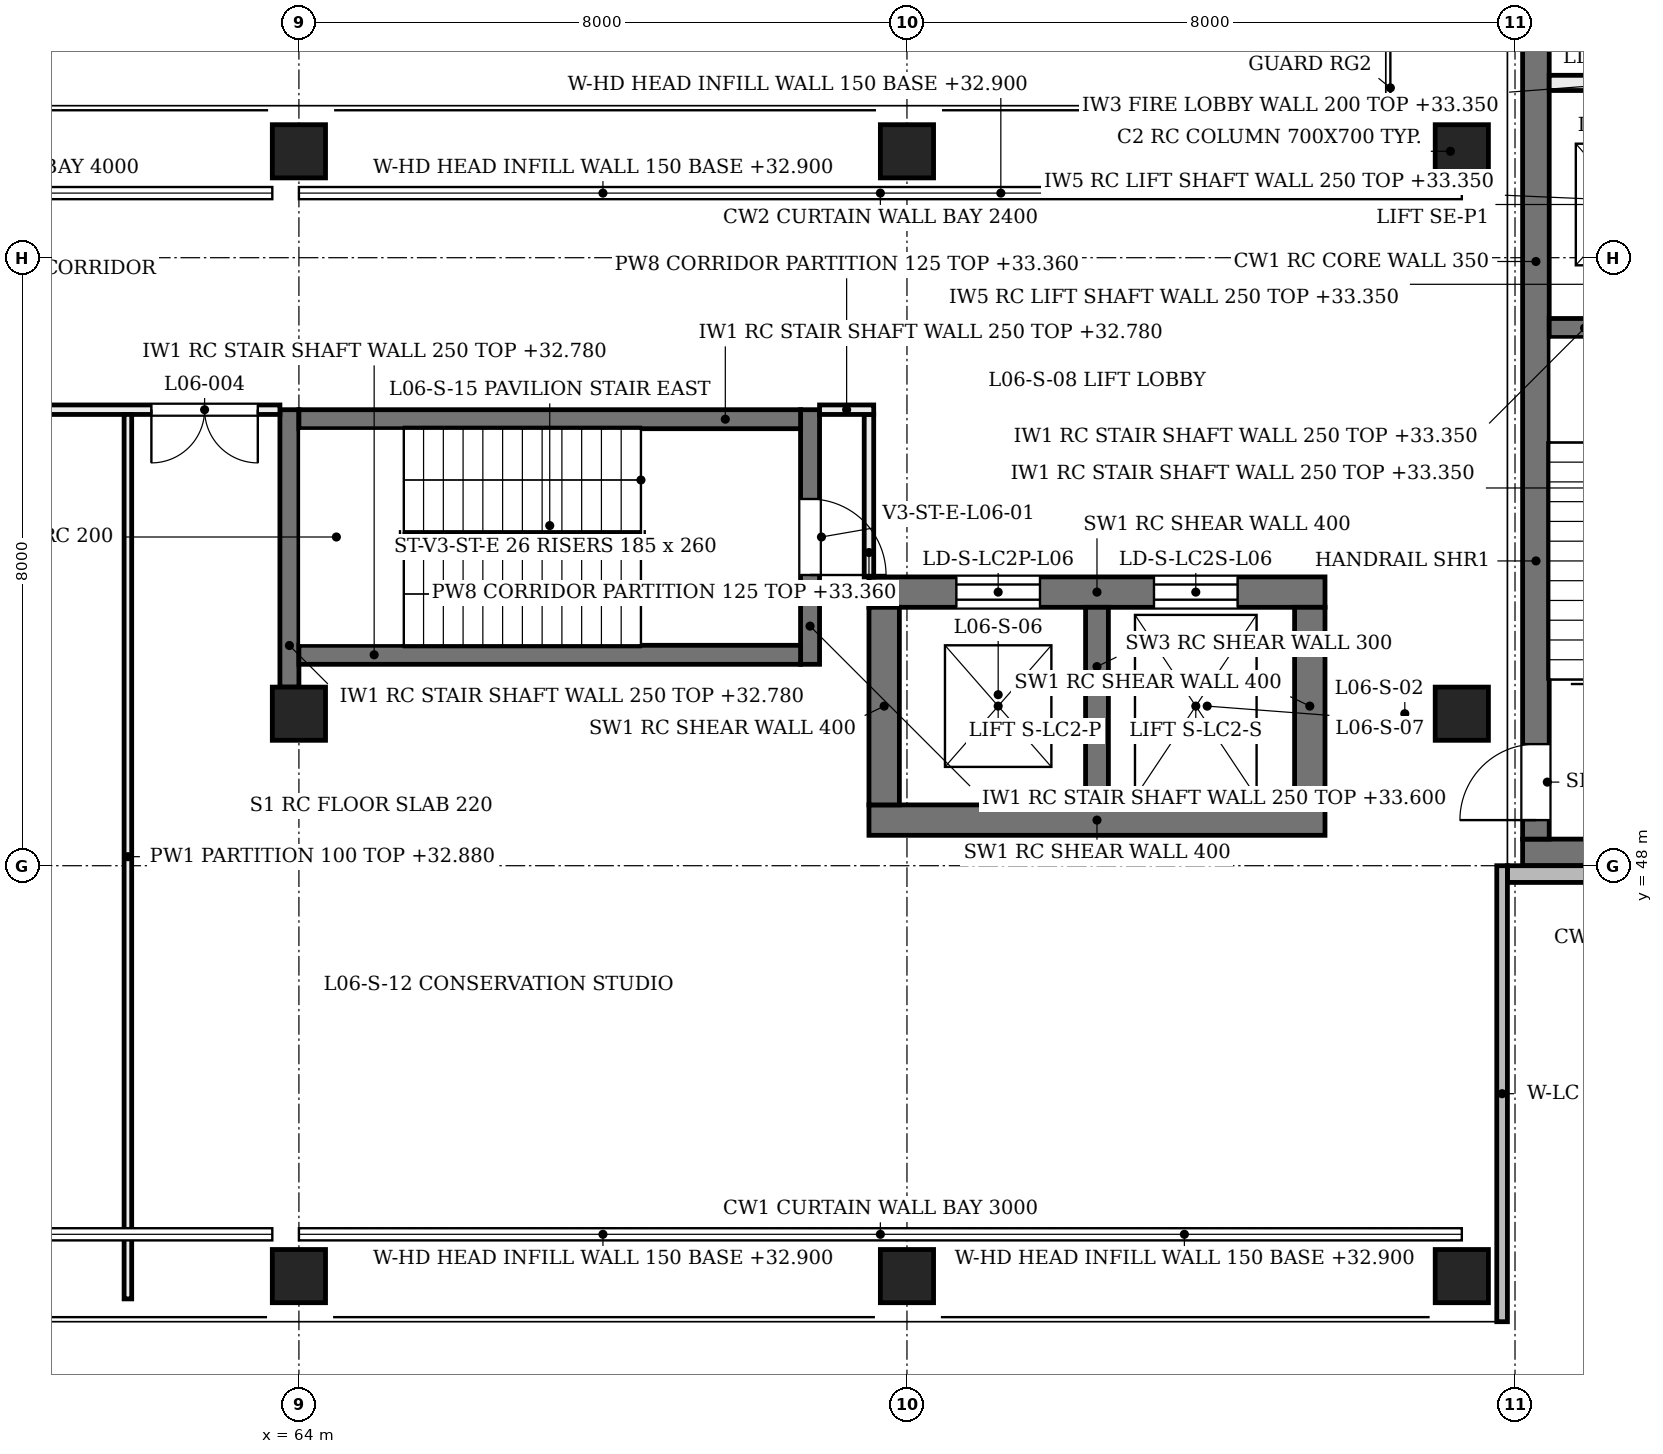
"""IFC4 building model, lengths in metres.
Left out: names, types, materials, properties, quantities, classifications, styles, units other than length and angle.
Written with IfcOpenShell. Run it as: python <this file> out.ifc"""

import sys

from ifc_helpers import new_model, si_unit, direction, frame, frame_2d, origin, origin_2d, place, context, subcontext, project, spatial, rectangle, extrude, element, fill, save


model = new_model("IFC4")
c1 = context("Model", 3, precision=1e-05, world=origin(), true_north=direction((0.0, 1.0)))
c2 = subcontext(c1, "Body", "Model", "MODEL_VIEW")
j1 = project(units=[si_unit("LENGTHUNIT", "METRE"), si_unit("PLANEANGLEUNIT", "RADIAN")], contexts=[c1])
p1 = place(None, origin())
s1 = spatial("IfcSite", under=j1, at=p1, CompositionType="ELEMENT")
p2 = place(p1, origin())
s2 = spatial("IfcBuilding", under=s1, at=p2, CompositionType="ELEMENT")
p3 = place(p2, frame((0.0, 0.0, 28.8)))
s3 = spatial("IfcBuildingStorey", under=s2, at=p3, CompositionType="ELEMENT", Elevation=28.8)
p4 = place(p3, frame((71.5, 48.6, 0.0), z_axis=(0.0, 0.0, 1.0), x_axis=(1.0, 0.0, 0.0)))
e1 = element("IfcWall", 1, at=p4, inside=s3, PredefinedType="SHEAR", context=c2, shape_type="SweptSolid", body=[
    extrude(rectangle(XDim=6.0, YDim=0.4, at=frame_2d((3.0, 0.0))), origin(), (0.0, 0.0, 1.0), 4.58),
])
p5 = place(p3, frame((71.5, 51.6, 0.0), z_axis=(0.0, 0.0, 1.0), x_axis=(1.0, 0.0, 0.0)))
e2 = element("IfcWall", 2, at=p5, inside=s3, PredefinedType="SHEAR", context=c2, shape_type="SweptSolid", body=[
    extrude(rectangle(XDim=6.0, YDim=0.4, at=frame_2d((3.0, 0.0))), origin(), (0.0, 0.0, 1.0), 4.58),
])
p6 = place(p5, frame((1.15, 0.0, 0.0)))
e3 = element("IfcOpeningElement", 3, at=p6, cuts=e2, PredefinedType="OPENING", context=c2, shape_type="SweptSolid", body=[
    extrude(rectangle(XDim=1.1, YDim=2.1, at=frame_2d((0.55, 1.05))), frame((0.0, 0.21, 0.0), z_axis=(0.0, -1.0, 0.0), x_axis=(1.0, 0.0, 0.0)), (0.0, 0.0, 1.0), 0.42),
])
p7 = place(p5, frame((3.75, 0.0, 0.0)))
e4 = element("IfcOpeningElement", 4, at=p7, cuts=e2, PredefinedType="OPENING", context=c2, shape_type="SweptSolid", body=[
    extrude(rectangle(XDim=1.1, YDim=2.1, at=frame_2d((0.55, 1.05))), frame((0.0, 0.21, 0.0), z_axis=(0.0, -1.0, 0.0), x_axis=(1.0, 0.0, 0.0)), (0.0, 0.0, 1.0), 0.42),
])
for number, where, z_axis, x_axis in (
    (5, (71.7, 48.8, 0.0), (0.0, 0.0, 1.0), (0.0, 1.0, 0.0)),
    (6, (77.3, 48.8, 0.0), (0.0, 0.0, 1.0), (0.0, 1.0, 0.0)),
):
    element("IfcWall", number, at=place(p3, frame(where, z_axis=z_axis, x_axis=x_axis)), inside=s3, PredefinedType="SHEAR", context=c2, shape_type="SweptSolid", body=[
        extrude(rectangle(XDim=2.6, YDim=0.4, at=frame_2d((1.3, 0.0))), origin(), (0.0, 0.0, 1.0), 4.58),
    ])
p8 = place(p3, frame((74.5, 48.8, 0.0), z_axis=(0.0, 0.0, 1.0), x_axis=(0.0, 1.0, 0.0)))
e7 = element("IfcWall", 7, at=p8, inside=s3, PredefinedType="SHEAR", context=c2, shape_type="SweptSolid", body=[
    extrude(rectangle(XDim=2.6, YDim=0.3, at=frame_2d((1.3, 0.0))), origin(), (0.0, 0.0, 1.0), 4.58),
])
p9 = place(p3, frame((80.1, 48.175, 0.0), z_axis=(0.0, 0.0, 1.0), x_axis=(1.0, 0.0, 0.0)))
e8 = element("IfcWall", 8, at=p9, inside=s3, PredefinedType="SHEAR", context=c2, shape_type="SweptSolid", body=[
    extrude(rectangle(XDim=7.95, YDim=0.35, at=frame_2d((3.975, 0.0))), origin(), (0.0, 0.0, 1.0), 4.58),
])
p10 = place(p3, frame((80.275, 48.35, 0.0), z_axis=(0.0, 0.0, 1.0), x_axis=(0.0, 1.0, 0.0)))
e9 = element("IfcWall", 9, at=p10, inside=s3, PredefinedType="SHEAR", context=c2, shape_type="SweptSolid", body=[
    extrude(rectangle(XDim=15.2, YDim=0.35, at=frame_2d((7.6, 0.0))), origin(), (0.0, 0.0, 1.0), 4.58),
])
p11 = place(p10, frame((0.25, 0.0, 0.0)))
e10 = element("IfcOpeningElement", 10, at=p11, cuts=e9, PredefinedType="OPENING", context=c2, shape_type="SweptSolid", body=[
    extrude(rectangle(XDim=1.0, YDim=2.1, at=frame_2d((0.5, 1.05))), frame((0.0, 0.185, 0.0), z_axis=(0.0, -1.0, 0.0), x_axis=(1.0, 0.0, 0.0)), (0.0, 0.0, 1.0), 0.37),
])
p12 = place(p10, frame((10.6, 0.0, 0.0)))
e11 = element("IfcOpeningElement", 11, at=p12, cuts=e9, PredefinedType="OPENING", context=c2, shape_type="SweptSolid", body=[
    extrude(rectangle(XDim=1.4, YDim=2.1, at=frame_2d((0.7, 1.05))), frame((0.0, 0.185, 0.0), z_axis=(0.0, -1.0, 0.0), x_axis=(1.0, 0.0, 0.0)), (0.0, 0.0, 1.0), 0.37),
])
for number, where, z_axis, x_axis in (
    (12, (64.0, 42.6, 0.0), (0.0, 0.0, 1.0), (1.0, 0.0, 0.0)),
    (13, (72.0, 42.6, 0.0), (0.0, 0.0, 1.0), (1.0, 0.0, 0.0)),
    (14, (79.3, 42.6, 0.0), (0.0, 0.0, 1.0), (1.0, 0.0, 0.0)),
    (15, (64.0, 50.0, 0.0), (0.0, 0.0, 1.0), (1.0, 0.0, 0.0)),
    (16, (79.3, 50.0, 0.0), (0.0, 0.0, 1.0), (1.0, 0.0, 0.0)),
    (17, (64.0, 57.4, 0.0), (0.0, 0.0, 1.0), (1.0, 0.0, 0.0)),
    (18, (72.0, 57.4, 0.0), (0.0, 0.0, 1.0), (1.0, 0.0, 0.0)),
    (19, (79.3, 57.4, 0.0), (0.0, 0.0, 1.0), (1.0, 0.0, 0.0)),
):
    element("IfcColumn", number, at=place(p3, frame(where, z_axis=z_axis, x_axis=x_axis)), inside=s3, PredefinedType="COLUMN", context=c2, shape_type="SweptSolid", body=[
        extrude(rectangle(XDim=0.7, YDim=0.7, at=origin_2d()), origin(), (0.0, 0.0, 1.0), 4.58),
    ])
p13 = place(p3, frame((64.2, 43.15, 4.1), z_axis=(0.0, 0.0, 1.0), x_axis=(1.0, 0.0, 0.0)))
e20 = element("IfcWall", 20, at=p13, inside=s3, PredefinedType="SOLIDWALL", context=c2, shape_type="SweptSolid", body=[
    extrude(rectangle(XDim=7.6, YDim=0.15, at=frame_2d((3.8, 0.0))), origin(), (0.0, 0.0, 1.0), 0.48),
])
p14 = place(p3, frame((72.2, 43.15, 4.1), z_axis=(0.0, 0.0, 1.0), x_axis=(1.0, 0.0, 0.0)))
e21 = element("IfcWall", 21, at=p14, inside=s3, PredefinedType="SOLIDWALL", context=c2, shape_type="SweptSolid", body=[
    extrude(rectangle(XDim=6.9, YDim=0.15, at=frame_2d((3.45, 0.0))), origin(), (0.0, 0.0, 1.0), 0.48),
])
p15 = place(p3, frame((64.2, 56.85, 4.1), z_axis=(0.0, 0.0, 1.0), x_axis=(1.0, 0.0, 0.0)))
e22 = element("IfcWall", 22, at=p15, inside=s3, PredefinedType="SOLIDWALL", context=c2, shape_type="SweptSolid", body=[
    extrude(rectangle(XDim=7.6, YDim=0.15, at=frame_2d((3.8, 0.0))), origin(), (0.0, 0.0, 1.0), 0.48),
])
p16 = place(p3, frame((72.2, 56.85, 4.1), z_axis=(0.0, 0.0, 1.0), x_axis=(1.0, 0.0, 0.0)))
e23 = element("IfcWall", 23, at=p16, inside=s3, PredefinedType="SOLIDWALL", context=c2, shape_type="SweptSolid", body=[
    extrude(rectangle(XDim=6.9, YDim=0.15, at=frame_2d((3.45, 0.0))), origin(), (0.0, 0.0, 1.0), 0.48),
])
p17 = place(p3, frame((79.9, 47.89, 0.0), z_axis=(0.0, 0.0, 1.0), x_axis=(1.0, 0.0, 0.0)))
e24 = element("IfcWall", 24, at=p17, inside=s3, PredefinedType="SOLIDWALL", context=c2, shape_type="SweptSolid", body=[
    extrude(rectangle(XDim=8.2, YDim=0.22, at=frame_2d((4.1, 0.0))), origin(), (0.0, 0.0, 1.0), 3.9),
])
p18 = place(p17, frame((1.308, 0.0, 0.9)))
e25 = element("IfcOpeningElement", 25, at=p18, cuts=e24, PredefinedType="OPENING", context=c2, shape_type="SweptSolid", body=[
    extrude(rectangle(XDim=0.45, YDim=2.6, at=frame_2d((0.225, 1.3))), frame((0.0, 0.12, 0.0), z_axis=(0.0, -1.0, 0.0), x_axis=(1.0, 0.0, 0.0)), (0.0, 0.0, 1.0), 0.24),
])
p19 = place(p17, frame((3.975, 0.0, 0.9)))
e26 = element("IfcOpeningElement", 26, at=p19, cuts=e24, PredefinedType="OPENING", context=c2, shape_type="SweptSolid", body=[
    extrude(rectangle(XDim=0.45, YDim=2.6, at=frame_2d((0.225, 1.3))), frame((0.0, 0.12, 0.0), z_axis=(0.0, -1.0, 0.0), x_axis=(1.0, 0.0, 0.0)), (0.0, 0.0, 1.0), 0.24),
])
p20 = place(p17, frame((6.642, 0.0, 0.9)))
e27 = element("IfcOpeningElement", 27, at=p20, cuts=e24, PredefinedType="OPENING", context=c2, shape_type="SweptSolid", body=[
    extrude(rectangle(XDim=0.45, YDim=2.6, at=frame_2d((0.225, 1.3))), frame((0.0, 0.12, 0.0), z_axis=(0.0, -1.0, 0.0), x_axis=(1.0, 0.0, 0.0)), (0.0, 0.0, 1.0), 0.24),
])
p21 = place(p3, frame((79.83, 42.0, 0.0), z_axis=(0.0, 0.0, 1.0), x_axis=(0.0, 1.0, 0.0)))
e28 = element("IfcWall", 28, at=p21, inside=s3, PredefinedType="SOLIDWALL", context=c2, shape_type="SweptSolid", body=[
    extrude(rectangle(XDim=6.0, YDim=0.14, at=frame_2d((3.0, 0.0))), origin(), (0.0, 0.0, 1.0), 3.9),
])
p22 = place(p3, frame((83.55, 55.075, 0.0), z_axis=(0.0, 0.0, 1.0), x_axis=(-1.0, 0.0, 0.0)))
e29 = element("IfcWall", 29, at=p22, inside=s3, PredefinedType="SOLIDWALL", context=c2, shape_type="SweptSolid", body=[
    extrude(rectangle(XDim=3.1, YDim=0.25, at=frame_2d((1.55, 0.0))), origin(), (0.0, 0.0, 1.0), 4.55),
])
p23 = place(p3, frame((87.65, 58.3, 0.0), z_axis=(0.0, 0.0, 1.0), x_axis=(-1.0, 0.0, 0.0)))
e30 = element("IfcWall", 30, at=p23, inside=s3, PredefinedType="SOLIDWALL", context=c2, shape_type="SweptSolid", body=[
    extrude(rectangle(XDim=7.2, YDim=0.2, at=frame_2d((3.6, 0.0))), origin(), (0.0, 0.0, 1.0), 4.55),
])
p24 = place(p23, frame((0.5, 0.0, 0.0)))
e31 = element("IfcOpeningElement", 31, at=p24, cuts=e30, PredefinedType="OPENING", context=c2, shape_type="SweptSolid", body=[
    extrude(rectangle(XDim=1.1, YDim=2.1, at=frame_2d((0.55, 1.05))), frame((0.0, 0.11, 0.0), z_axis=(0.0, -1.0, 0.0), x_axis=(1.0, 0.0, 0.0)), (0.0, 0.0, 1.0), 0.22),
])
p25 = place(p23, frame((5.6, 0.0, 0.0)))
e32 = element("IfcOpeningElement", 32, at=p25, cuts=e30, PredefinedType="OPENING", context=c2, shape_type="SweptSolid", body=[
    extrude(rectangle(XDim=1.1, YDim=2.1, at=frame_2d((0.55, 1.05))), frame((0.0, 0.11, 0.0), z_axis=(0.0, -1.0, 0.0), x_axis=(1.0, 0.0, 0.0)), (0.0, 0.0, 1.0), 0.22),
])
p26 = place(p23, frame((3.1, 0.0, 0.0)))
e33 = element("IfcOpeningElement", 33, at=p26, cuts=e30, PredefinedType="OPENING", context=c2, shape_type="SweptSolid", body=[
    extrude(rectangle(XDim=1.0, YDim=2.1, at=frame_2d((0.5, 1.05))), frame((0.0, 0.11, 0.0), z_axis=(0.0, -1.0, 0.0), x_axis=(1.0, 0.0, 0.0)), (0.0, 0.0, 1.0), 0.22),
])
p27 = place(p3, frame((63.875, 50.35, 0.0), z_axis=(0.0, 0.0, 1.0), x_axis=(0.0, 1.0, 0.0)))
e34 = element("IfcWall", 34, at=p27, inside=s3, PredefinedType="SOLIDWALL", context=c2, shape_type="SweptSolid", body=[
    extrude(rectangle(XDim=3.65, YDim=0.25, at=frame_2d((1.825, 0.0))), origin(), (0.0, 0.0, 1.0), 3.98),
])
p28 = place(p3, frame((70.725, 50.65, 0.0), z_axis=(0.0, 0.0, 1.0), x_axis=(0.0, 1.0, 0.0)))
e35 = element("IfcWall", 35, at=p28, inside=s3, PredefinedType="SOLIDWALL", context=c2, shape_type="SweptSolid", body=[
    extrude(rectangle(XDim=3.35, YDim=0.25, at=frame_2d((1.675, 0.0))), origin(), (0.0, 0.0, 1.0), 4.8),
])
p29 = place(p28, frame((1.175, 0.0, 0.0)))
e36 = element("IfcOpeningElement", 36, at=p29, cuts=e35, PredefinedType="OPENING", context=c2, shape_type="SweptSolid", body=[
    extrude(rectangle(XDim=1.0, YDim=2.1, at=frame_2d((0.5, 1.05))), frame((0.0, 0.135, 0.0), z_axis=(0.0, -1.0, 0.0), x_axis=(1.0, 0.0, 0.0)), (0.0, 0.0, 1.0), 0.27),
])
for number, where, z_axis, x_axis in (
    (37, (64.0, 50.775, 0.0), (0.0, 0.0, 1.0), (1.0, 0.0, 0.0)),
    (38, (64.0, 53.875, 0.0), (0.0, 0.0, 1.0), (1.0, 0.0, 0.0)),
):
    element("IfcWall", number, at=place(p3, frame(where, z_axis=z_axis, x_axis=x_axis)), inside=s3, PredefinedType="SOLIDWALL", context=c2, shape_type="SweptSolid", body=[
        extrude(rectangle(XDim=6.6, YDim=0.25, at=frame_2d((3.3, 0.0))), origin(), (0.0, 0.0, 1.0), 3.98),
    ])
p30 = place(p3, frame((71.5, 51.8, 0.0), z_axis=(0.0, 0.0, 1.0), x_axis=(0.0, 1.0, 0.0)))
e39 = element("IfcWall", 39, at=p30, inside=s3, PredefinedType="PARTITIONING", context=c2, shape_type="SweptSolid", body=[
    extrude(rectangle(XDim=2.137, YDim=0.125, at=frame_2d((1.069, 0.0))), origin(), (0.0, 0.0, 1.0), 4.56),
])
p31 = place(p3, frame((40.25, 54.0, 0.0), z_axis=(0.0, 0.0, 1.0), x_axis=(1.0, 0.0, 0.0)))
e40 = element("IfcWall", 40, at=p31, inside=s3, PredefinedType="PARTITIONING", context=c2, shape_type="SweptSolid", body=[
    extrude(rectangle(XDim=23.5, YDim=0.125, at=frame_2d((11.75, 0.0))), origin(), (0.0, 0.0, 1.0), 3.98),
])
p32 = place(p31, frame((0.2, 0.0, 0.0)))
e41 = element("IfcOpeningElement", 41, at=p32, cuts=e40, PredefinedType="OPENING", context=c2, shape_type="SweptSolid", body=[
    extrude(rectangle(XDim=1.4, YDim=2.2, at=frame_2d((0.7, 1.1))), frame((0.0, 0.073, 0.0), z_axis=(0.0, -1.0, 0.0), x_axis=(1.0, 0.0, 0.0)), (0.0, 0.0, 1.0), 0.145),
])
p33 = place(p31, frame((6.179, 0.0, 0.0)))
e42 = element("IfcOpeningElement", 42, at=p33, cuts=e40, PredefinedType="OPENING", context=c2, shape_type="SweptSolid", body=[
    extrude(rectangle(XDim=1.6, YDim=2.2, at=frame_2d((0.8, 1.1))), frame((0.0, 0.073, 0.0), z_axis=(0.0, -1.0, 0.0), x_axis=(1.0, 0.0, 0.0)), (0.0, 0.0, 1.0), 0.145),
])
p34 = place(p31, frame((15.929, 0.0, 0.0)))
e43 = element("IfcOpeningElement", 43, at=p34, cuts=e40, PredefinedType="OPENING", context=c2, shape_type="SweptSolid", body=[
    extrude(rectangle(XDim=1.6, YDim=2.2, at=frame_2d((0.8, 1.1))), frame((0.0, 0.073, 0.0), z_axis=(0.0, -1.0, 0.0), x_axis=(1.0, 0.0, 0.0)), (0.0, 0.0, 1.0), 0.145),
])
p35 = place(p31, frame((21.809, 0.0, 0.0)))
e44 = element("IfcOpeningElement", 44, at=p35, cuts=e40, PredefinedType="OPENING", context=c2, shape_type="SweptSolid", body=[
    extrude(rectangle(XDim=1.4, YDim=2.2, at=frame_2d((0.7, 1.1))), frame((0.0, 0.073, 0.0), z_axis=(0.0, -1.0, 0.0), x_axis=(1.0, 0.0, 0.0)), (0.0, 0.0, 1.0), 0.145),
])
p36 = place(p3, frame((70.85, 54.0, 0.0), z_axis=(0.0, 0.0, 1.0), x_axis=(1.0, 0.0, 0.0)))
e45 = element("IfcWall", 45, at=p36, inside=s3, PredefinedType="PARTITIONING", context=c2, shape_type="SweptSolid", body=[
    extrude(rectangle(XDim=0.712, YDim=0.125, at=frame_2d((0.356, 0.0))), origin(), (0.0, 0.0, 1.0), 4.56),
])
p37 = place(p3, frame((61.75, 42.3, 0.0), z_axis=(0.0, 0.0, 1.0), x_axis=(0.0, 1.0, 0.0)))
e46 = element("IfcWall", 46, at=p37, inside=s3, PredefinedType="PARTITIONING", context=c2, shape_type="SweptSolid", body=[
    extrude(rectangle(XDim=11.637, YDim=0.1, at=frame_2d((5.819, 0.0))), origin(), (0.0, 0.0, 1.0), 4.08),
])
p38 = place(p11, origin())
e47 = element("IfcDoor", 47, at=p38, inside=s3, OperationType="SINGLE_SWING_LEFT", PredefinedType="DOOR", context=c2, shape_type="SweptSolid", body=[
    extrude(rectangle(XDim=1.0, YDim=2.1, at=frame_2d((0.5, 1.05))), frame((0.0, 0.025, 0.0), z_axis=(0.0, -1.0, 0.0), x_axis=(1.0, 0.0, 0.0)), (0.0, 0.0, 1.0), 0.05),
])
fill(e10, e47)
p39 = place(p6, origin())
e48 = element("IfcDoor", 48, at=p39, inside=s3, OperationType="DOUBLE_DOOR_SLIDING", PredefinedType="DOOR", context=c2, shape_type="SweptSolid", body=[
    extrude(rectangle(XDim=1.1, YDim=2.1, at=frame_2d((0.55, 1.05))), frame((0.0, 0.025, 0.0), z_axis=(0.0, -1.0, 0.0), x_axis=(1.0, 0.0, 0.0)), (0.0, 0.0, 1.0), 0.05),
])
fill(e3, e48)
p40 = place(p7, origin())
e49 = element("IfcDoor", 49, at=p40, inside=s3, OperationType="DOUBLE_DOOR_SLIDING", PredefinedType="DOOR", context=c2, shape_type="SweptSolid", body=[
    extrude(rectangle(XDim=1.1, YDim=2.1, at=frame_2d((0.55, 1.05))), frame((0.0, 0.025, 0.0), z_axis=(0.0, -1.0, 0.0), x_axis=(1.0, 0.0, 0.0)), (0.0, 0.0, 1.0), 0.05),
])
fill(e4, e49)
p41 = place(p29, frame((1.0, 0.0, 0.0), z_axis=(0.0, 0.0, 1.0), x_axis=(-1.0, 0.0, 0.0)))
e50 = element("IfcDoor", 50, at=p41, inside=s3, OperationType="SINGLE_SWING_LEFT", PredefinedType="DOOR", context=c2, shape_type="SweptSolid", body=[
    extrude(rectangle(XDim=1.0, YDim=2.1, at=frame_2d((0.5, 1.05))), frame((0.0, 0.025, 0.0), z_axis=(0.0, -1.0, 0.0), x_axis=(1.0, 0.0, 0.0)), (0.0, 0.0, 1.0), 0.05),
])
fill(e36, e50)
p42 = place(p35, frame((1.4, 0.0, 0.0), z_axis=(0.0, 0.0, 1.0), x_axis=(-1.0, 0.0, 0.0)))
e51 = element("IfcDoor", 51, at=p42, inside=s3, OperationType="DOUBLE_DOOR_SINGLE_SWING", PredefinedType="DOOR", context=c2, shape_type="SweptSolid", body=[
    extrude(rectangle(XDim=1.4, YDim=2.2, at=frame_2d((0.7, 1.1))), frame((0.0, 0.025, 0.0), z_axis=(0.0, -1.0, 0.0), x_axis=(1.0, 0.0, 0.0)), (0.0, 0.0, 1.0), 0.05),
])
fill(e44, e51)
save(model, sys.argv[1])
